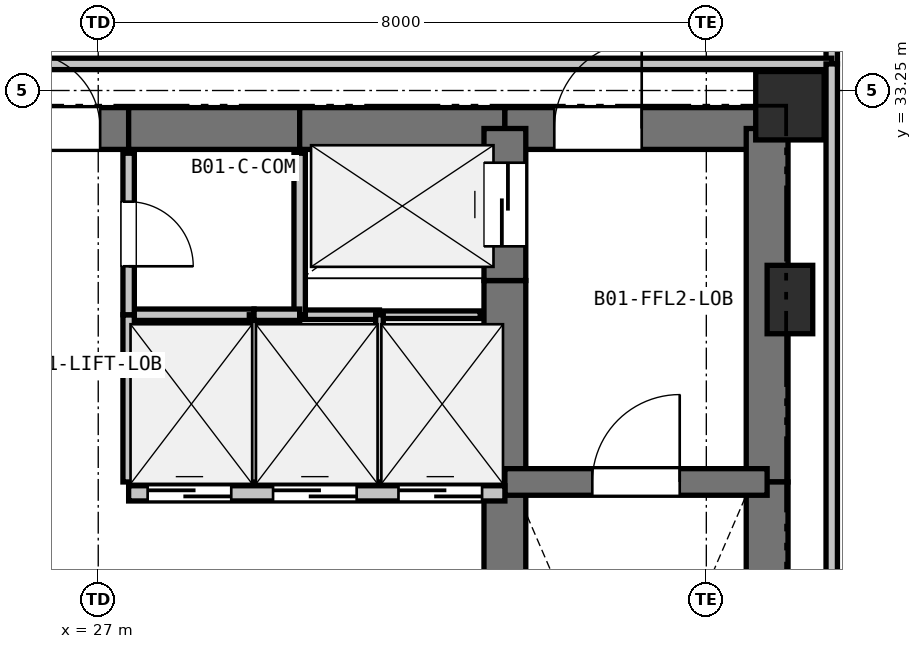
"""IFC4 building model, lengths in metres.
Left out: names, types, materials, properties, quantities, classifications, styles, units other than length and angle.
Written with IfcOpenShell. Run it as: python <this file> out.ifc"""

import sys

from ifc_helpers import new_model, si_unit, direction, frame, frame_2d, origin, origin_2d, place, context, subcontext, project, spatial, rectangle, extrude, element, fill, save


model = new_model("IFC4")
c1 = context("Model", 3, precision=1e-05, world=origin(), true_north=direction((0.0, 1.0)))
c2 = subcontext(c1, "Body", "Model", "MODEL_VIEW")
j1 = project(units=[si_unit("LENGTHUNIT", "METRE"), si_unit("PLANEANGLEUNIT", "RADIAN")], contexts=[c1])
p1 = place(None, origin())
s1 = spatial("IfcSite", under=j1, at=p1, CompositionType="ELEMENT")
p2 = place(p1, origin())
s2 = spatial("IfcBuilding", under=s1, at=p2, CompositionType="ELEMENT")
p3 = place(p2, frame((0.0, 0.0, -4.5)))
s3 = spatial("IfcBuildingStorey", under=s2, at=p3, CompositionType="ELEMENT", Elevation=-4.5)
p4 = place(p3, frame((36.1, 33.05, 0.0), z_axis=(0.0, 0.0, 1.0), x_axis=(1.0, 0.0, 0.0)))
e1 = element("IfcColumn", 1, at=p4, inside=s3, PredefinedType="COLUMN", context=c2, shape_type="SweptSolid", body=[
    extrude(rectangle(XDim=0.9, YDim=0.9, at=origin_2d()), origin(), (0.0, 0.0, 1.0), 4.5),
])
p5 = place(p3, frame((36.1, 30.5, 0.0), z_axis=(0.0, 0.0, 1.0), x_axis=(1.0, 0.0, 0.0)))
e2 = element("IfcColumn", 2, at=p5, inside=s3, PredefinedType="PILASTER", context=c2, shape_type="SweptSolid", body=[
    extrude(rectangle(XDim=0.6, YDim=0.9, at=origin_2d()), origin(), (0.0, 0.0, 1.0), 4.5),
])
p6 = place(p3, frame((25.65, 32.75, 0.0), z_axis=(0.0, 0.0, 1.0), x_axis=(1.0, 0.0, 0.0)))
e3 = element("IfcWall", 3, at=p6, inside=s3, PredefinedType="SHEAR", context=c2, shape_type="SweptSolid", body=[
    extrude(rectangle(XDim=1.75, YDim=0.55, at=frame_2d((0.875, 0.0))), origin(), (0.0, 0.0, 1.0), 4.2),
])
p7 = place(p6, frame((0.375, 0.0, 0.0)))
e4 = element("IfcOpeningElement", 4, at=p7, cuts=e3, PredefinedType="OPENING", context=c2, shape_type="SweptSolid", body=[
    extrude(rectangle(XDim=1.0, YDim=2.15, at=frame_2d((0.5, 1.075))), frame((0.0, 0.285, 0.0), z_axis=(0.0, -1.0, 0.0), x_axis=(1.0, 0.0, 0.0)), (0.0, 0.0, 1.0), 0.57),
])
p8 = place(p3, frame((27.4, 32.75, 0.0), z_axis=(0.0, 0.0, 1.0), x_axis=(1.0, 0.0, 0.0)))
e5 = element("IfcWall", 5, at=p8, inside=s3, PredefinedType="SHEAR", context=c2, shape_type="SweptSolid", body=[
    extrude(rectangle(XDim=2.25, YDim=0.55, at=frame_2d((1.125, 0.0))), origin(), (0.0, 0.0, 1.0), 4.2),
])
p9 = place(p3, frame((29.65, 32.75, 0.0), z_axis=(0.0, 0.0, 1.0), x_axis=(1.0, 0.0, 0.0)))
e6 = element("IfcWall", 6, at=p9, inside=s3, PredefinedType="SHEAR", context=c2, shape_type="SweptSolid", body=[
    extrude(rectangle(XDim=2.7, YDim=0.55, at=frame_2d((1.35, 0.0))), origin(), (0.0, 0.0, 1.0), 4.2),
])
p10 = place(p3, frame((32.35, 32.75, 0.0), z_axis=(0.0, 0.0, 1.0), x_axis=(1.0, 0.0, 0.0)))
e7 = element("IfcWall", 7, at=p10, inside=s3, PredefinedType="SHEAR", context=c2, shape_type="SweptSolid", body=[
    extrude(rectangle(XDim=3.45, YDim=0.55, at=frame_2d((1.725, 0.0))), origin(), (0.0, 0.0, 1.0), 4.2),
])
p11 = place(p10, frame((0.65, 0.0, 0.0)))
e8 = element("IfcOpeningElement", 8, at=p11, cuts=e7, PredefinedType="OPENING", context=c2, shape_type="SweptSolid", body=[
    extrude(rectangle(XDim=1.15, YDim=2.15, at=frame_2d((0.575, 1.075))), frame((0.0, 0.285, 0.0), z_axis=(0.0, -1.0, 0.0), x_axis=(1.0, 0.0, 0.0)), (0.0, 0.0, 1.0), 0.57),
])
p12 = place(p3, frame((35.8, 32.75, 0.0), z_axis=(0.0, 0.0, 1.0), x_axis=(0.0, -1.0, 0.0)))
e9 = element("IfcWall", 9, at=p12, inside=s3, PredefinedType="SHEAR", context=c2, shape_type="SweptSolid", body=[
    extrude(rectangle(XDim=4.65, YDim=0.55, at=frame_2d((2.325, 0.0))), origin(), (0.0, 0.0, 1.0), 4.2),
])
p13 = place(p3, frame((35.8, 28.1, 0.0), z_axis=(0.0, 0.0, 1.0), x_axis=(0.0, -1.0, 0.0)))
e10 = element("IfcWall", 10, at=p13, inside=s3, PredefinedType="SHEAR", context=c2, shape_type="SweptSolid", body=[
    extrude(rectangle(XDim=7.35, YDim=0.55, at=frame_2d((3.675, 0.0))), origin(), (0.0, 0.0, 1.0), 4.2),
])
p14 = place(p3, frame((32.35, 25.55, 0.0), z_axis=(0.0, 0.0, 1.0), x_axis=(0.0, 1.0, 0.0)))
e11 = element("IfcWall", 11, at=p14, inside=s3, PredefinedType="SHEAR", context=c2, shape_type="SweptSolid", body=[
    extrude(rectangle(XDim=2.4, YDim=0.55, at=frame_2d((1.2, 0.0))), origin(), (0.0, 0.0, 1.0), 4.2),
])
p15 = place(p3, frame((32.35, 27.95, 0.0), z_axis=(0.0, 0.0, 1.0), x_axis=(0.0, 1.0, 0.0)))
e12 = element("IfcWall", 12, at=p15, inside=s3, PredefinedType="SHEAR", context=c2, shape_type="SweptSolid", body=[
    extrude(rectangle(XDim=2.8, YDim=0.55, at=frame_2d((1.4, 0.0))), origin(), (0.0, 0.0, 1.0), 4.2),
])
p16 = place(p3, frame((32.35, 30.75, 0.0), z_axis=(0.0, 0.0, 1.0), x_axis=(0.0, 1.0, 0.0)))
e13 = element("IfcWall", 13, at=p16, inside=s3, PredefinedType="SHEAR", context=c2, shape_type="SweptSolid", body=[
    extrude(rectangle(XDim=2.0, YDim=0.55, at=frame_2d((1.0, 0.0))), origin(), (0.0, 0.0, 1.0), 4.2),
])
p17 = place(p16, frame((0.45, 0.0, 0.0)))
e14 = element("IfcOpeningElement", 14, at=p17, cuts=e13, PredefinedType="OPENING", context=c2, shape_type="SweptSolid", body=[
    extrude(rectangle(XDim=1.1, YDim=2.15, at=frame_2d((0.55, 1.075))), frame((0.0, 0.285, 0.0), z_axis=(0.0, -1.0, 0.0), x_axis=(1.0, 0.0, 0.0)), (0.0, 0.0, 1.0), 0.57),
])
p18 = place(p3, frame((32.35, 28.1, 0.0), z_axis=(0.0, 0.0, 1.0), x_axis=(1.0, 0.0, 0.0)))
e15 = element("IfcWall", 15, at=p18, inside=s3, PredefinedType="SHEAR", context=c2, shape_type="SweptSolid", body=[
    extrude(rectangle(XDim=3.45, YDim=0.35, at=frame_2d((1.725, 0.0))), origin(), (0.0, 0.0, 1.0), 4.2),
])
p19 = place(p18, frame((1.15, 0.0, 0.0)))
e16 = element("IfcOpeningElement", 16, at=p19, cuts=e15, PredefinedType="OPENING", context=c2, shape_type="SweptSolid", body=[
    extrude(rectangle(XDim=1.15, YDim=2.15, at=frame_2d((0.575, 1.075))), frame((0.0, 0.185, 0.0), z_axis=(0.0, -1.0, 0.0), x_axis=(1.0, 0.0, 0.0)), (0.0, 0.0, 1.0), 0.37),
])
p20 = place(p3, frame((27.4, 27.95, 0.0), z_axis=(0.0, 0.0, 1.0), x_axis=(1.0, 0.0, 0.0)))
e17 = element("IfcWall", 17, at=p20, inside=s3, PredefinedType="PARTITIONING", context=c2, shape_type="SweptSolid", body=[
    extrude(rectangle(XDim=4.95, YDim=0.2, at=frame_2d((2.475, 0.0))), origin(), (0.0, 0.0, 1.0), 4.2),
])
p21 = place(p20, frame((0.25, 0.0, 0.0)))
e18 = element("IfcOpeningElement", 18, at=p21, cuts=e17, PredefinedType="OPENING", context=c2, shape_type="SweptSolid", body=[
    extrude(rectangle(XDim=1.1, YDim=2.15, at=frame_2d((0.55, 1.075))), frame((0.0, 0.11, 0.0), z_axis=(0.0, -1.0, 0.0), x_axis=(1.0, 0.0, 0.0)), (0.0, 0.0, 1.0), 0.22),
])
p22 = place(p20, frame((1.9, 0.0, 0.0)))
e19 = element("IfcOpeningElement", 19, at=p22, cuts=e17, PredefinedType="OPENING", context=c2, shape_type="SweptSolid", body=[
    extrude(rectangle(XDim=1.1, YDim=2.15, at=frame_2d((0.55, 1.075))), frame((0.0, 0.11, 0.0), z_axis=(0.0, -1.0, 0.0), x_axis=(1.0, 0.0, 0.0)), (0.0, 0.0, 1.0), 0.22),
])
p23 = place(p20, frame((3.55, 0.0, 0.0)))
e20 = element("IfcOpeningElement", 20, at=p23, cuts=e17, PredefinedType="OPENING", context=c2, shape_type="SweptSolid", body=[
    extrude(rectangle(XDim=1.1, YDim=2.15, at=frame_2d((0.55, 1.075))), frame((0.0, 0.11, 0.0), z_axis=(0.0, -1.0, 0.0), x_axis=(1.0, 0.0, 0.0)), (0.0, 0.0, 1.0), 0.22),
])
p24 = place(p3, frame((32.025, 30.3, 0.0), z_axis=(0.0, 0.0, 1.0), x_axis=(-1.0, 0.0, 0.0)))
e21 = element("IfcWall", 21, at=p24, inside=s3, PredefinedType="PARTITIONING", context=c2, shape_type="SweptSolid", body=[
    extrude(rectangle(XDim=1.325, YDim=0.1, at=frame_2d((0.663, 0.0))), origin(), (0.0, 0.0, 1.0), 4.2),
])
p25 = place(p3, frame((30.7, 30.3, 0.0), z_axis=(0.0, 0.0, 1.0), x_axis=(-1.0, 0.0, 0.0)))
e22 = element("IfcWall", 22, at=p25, inside=s3, PredefinedType="PARTITIONING", context=c2, shape_type="SweptSolid", body=[
    extrude(rectangle(XDim=1.05, YDim=0.125, at=frame_2d((0.525, 0.0))), origin(), (0.0, 0.0, 1.0), 4.2),
])
p26 = place(p3, frame((29.65, 30.3, 0.0), z_axis=(0.0, 0.0, 1.0), x_axis=(0.0, 1.0, 0.0)))
e23 = element("IfcWall", 23, at=p26, inside=s3, PredefinedType="PARTITIONING", context=c2, shape_type="SweptSolid", body=[
    extrude(rectangle(XDim=2.125, YDim=0.15, at=frame_2d((1.062, 0.0))), origin(), (0.0, 0.0, 1.0), 4.2),
])
p27 = place(p3, frame((27.4, 30.3, 0.0), z_axis=(0.0, 0.0, 1.0), x_axis=(1.0, 0.0, 0.0)))
e24 = element("IfcWall", 24, at=p27, inside=s3, PredefinedType="PARTITIONING", context=c2, shape_type="SweptSolid", body=[
    extrude(rectangle(XDim=1.65, YDim=0.15, at=frame_2d((0.825, 0.0))), origin(), (0.0, 0.0, 1.0), 4.2),
])
p28 = place(p3, frame((29.05, 30.3, 0.0), z_axis=(0.0, 0.0, 1.0), x_axis=(0.0, -1.0, 0.0)))
e25 = element("IfcWall", 25, at=p28, inside=s3, PredefinedType="PARTITIONING", context=c2, shape_type="SweptSolid", body=[
    extrude(rectangle(XDim=2.2, YDim=0.125, at=frame_2d((1.1, 0.0))), origin(), (0.0, 0.0, 1.0), 4.2),
])
p29 = place(p3, frame((27.4, 28.1, 0.0), z_axis=(0.0, 0.0, 1.0), x_axis=(0.0, 1.0, 0.0)))
e26 = element("IfcWall", 26, at=p29, inside=s3, PredefinedType="PARTITIONING", context=c2, shape_type="SweptSolid", body=[
    extrude(rectangle(XDim=2.2, YDim=0.15, at=frame_2d((1.1, 0.0))), origin(), (0.0, 0.0, 1.0), 4.2),
])
p30 = place(p3, frame((29.05, 30.3, 0.0), z_axis=(0.0, 0.0, 1.0), x_axis=(1.0, 0.0, 0.0)))
e27 = element("IfcWall", 27, at=p30, inside=s3, PredefinedType="PARTITIONING", context=c2, shape_type="SweptSolid", body=[
    extrude(rectangle(XDim=0.6, YDim=0.15, at=frame_2d((0.3, 0.0))), origin(), (0.0, 0.0, 1.0), 4.2),
])
p31 = place(p3, frame((30.7, 30.3, 0.0), z_axis=(0.0, 0.0, 1.0), x_axis=(0.0, -1.0, 0.0)))
e28 = element("IfcWall", 28, at=p31, inside=s3, PredefinedType="PARTITIONING", context=c2, shape_type="SweptSolid", body=[
    extrude(rectangle(XDim=2.2, YDim=0.1, at=frame_2d((1.1, 0.0))), origin(), (0.0, 0.0, 1.0), 4.2),
])
p32 = place(p3, frame((27.4, 32.425, 0.0), z_axis=(0.0, 0.0, 1.0), x_axis=(0.0, -1.0, 0.0)))
e29 = element("IfcWall", 29, at=p32, inside=s3, PredefinedType="PARTITIONING", context=c2, shape_type="SweptSolid", body=[
    extrude(rectangle(XDim=2.125, YDim=0.15, at=frame_2d((1.062, 0.0))), origin(), (0.0, 0.0, 1.0), 4.2),
])
p33 = place(p32, frame((0.637, 0.0, 0.0)))
e30 = element("IfcOpeningElement", 30, at=p33, cuts=e29, PredefinedType="OPENING", context=c2, shape_type="SweptSolid", body=[
    extrude(rectangle(XDim=0.85, YDim=2.1, at=frame_2d((0.425, 1.05))), frame((0.0, 0.085, 0.0), z_axis=(0.0, -1.0, 0.0), x_axis=(1.0, 0.0, 0.0)), (0.0, 0.0, 1.0), 0.17),
])
p34 = place(p3, frame((36.65, 35.4, 0.0), z_axis=(0.0, 0.0, 1.0), x_axis=(0.0, -1.0, 0.0)))
e31 = element("IfcWall", 31, at=p34, inside=s3, PredefinedType="PARTITIONING", context=c2, shape_type="SweptSolid", body=[
    extrude(rectangle(XDim=1.8, YDim=0.15, at=frame_2d((0.9, 0.0))), origin(), (0.0, 0.0, 1.0), 4.2),
])
p35 = place(p34, frame((0.4, 0.0, 0.0)))
e32 = element("IfcOpeningElement", 32, at=p35, cuts=e31, PredefinedType="OPENING", context=c2, shape_type="SweptSolid", body=[
    extrude(rectangle(XDim=1.0, YDim=2.15, at=frame_2d((0.5, 1.075))), frame((0.0, 0.085, 0.0), z_axis=(0.0, -1.0, 0.0), x_axis=(1.0, 0.0, 0.0)), (0.0, 0.0, 1.0), 0.17),
])
p36 = place(p3, frame((36.65, 33.6, 0.0), z_axis=(0.0, 0.0, 1.0), x_axis=(-1.0, 0.0, 0.0)))
e33 = element("IfcWall", 33, at=p36, inside=s3, PredefinedType="PARTITIONING", context=c2, shape_type="SweptSolid", body=[
    extrude(rectangle(XDim=15.3, YDim=0.15, at=frame_2d((7.65, 0.0))), origin(), (0.0, 0.0, 1.0), 4.2),
])
p37 = place(p3, frame((36.65, 19.9, 0.0), z_axis=(0.0, 0.0, 1.0), x_axis=(0.0, 1.0, 0.0)))
e34 = element("IfcWall", 34, at=p37, inside=s3, PredefinedType="PARTITIONING", context=c2, shape_type="SweptSolid", body=[
    extrude(rectangle(XDim=13.7, YDim=0.15, at=frame_2d((6.85, 0.0))), origin(), (0.0, 0.0, 1.0), 4.2),
])
p38 = place(p21, origin())
e35 = element("IfcDoor", 35, at=p38, inside=s3, OperationType="SLIDING_TO_LEFT", PredefinedType="DOOR", context=c2, shape_type="SweptSolid", body=[
    extrude(rectangle(XDim=1.1, YDim=2.15, at=frame_2d((0.55, 1.075))), frame((0.0, 0.025, 0.0), z_axis=(0.0, -1.0, 0.0), x_axis=(1.0, 0.0, 0.0)), (0.0, 0.0, 1.0), 0.05),
])
fill(e18, e35)
p39 = place(p22, origin())
e36 = element("IfcDoor", 36, at=p39, inside=s3, OperationType="SLIDING_TO_LEFT", PredefinedType="DOOR", context=c2, shape_type="SweptSolid", body=[
    extrude(rectangle(XDim=1.1, YDim=2.15, at=frame_2d((0.55, 1.075))), frame((0.0, 0.025, 0.0), z_axis=(0.0, -1.0, 0.0), x_axis=(1.0, 0.0, 0.0)), (0.0, 0.0, 1.0), 0.05),
])
fill(e19, e36)
p40 = place(p23, origin())
e37 = element("IfcDoor", 37, at=p40, inside=s3, OperationType="SLIDING_TO_LEFT", PredefinedType="DOOR", context=c2, shape_type="SweptSolid", body=[
    extrude(rectangle(XDim=1.1, YDim=2.15, at=frame_2d((0.55, 1.075))), frame((0.0, 0.025, 0.0), z_axis=(0.0, -1.0, 0.0), x_axis=(1.0, 0.0, 0.0)), (0.0, 0.0, 1.0), 0.05),
])
fill(e20, e37)
p41 = place(p7, origin())
e38 = element("IfcDoor", 38, at=p41, inside=s3, OperationType="SINGLE_SWING_LEFT", PredefinedType="DOOR", context=c2, shape_type="SweptSolid", body=[
    extrude(rectangle(XDim=1.0, YDim=2.15, at=frame_2d((0.5, 1.075))), frame((0.0, 0.025, 0.0), z_axis=(0.0, -1.0, 0.0), x_axis=(1.0, 0.0, 0.0)), (0.0, 0.0, 1.0), 0.05),
])
fill(e4, e38)
p42 = place(p17, origin())
e39 = element("IfcDoor", 39, at=p42, inside=s3, OperationType="SLIDING_TO_LEFT", PredefinedType="DOOR", context=c2, shape_type="SweptSolid", body=[
    extrude(rectangle(XDim=1.1, YDim=2.15, at=frame_2d((0.55, 1.075))), frame((0.0, 0.025, 0.0), z_axis=(0.0, -1.0, 0.0), x_axis=(1.0, 0.0, 0.0)), (0.0, 0.0, 1.0), 0.05),
])
fill(e14, e39)
p43 = place(p19, origin())
e40 = element("IfcDoor", 40, at=p43, inside=s3, OperationType="SINGLE_SWING_RIGHT", PredefinedType="DOOR", context=c2, shape_type="SweptSolid", body=[
    extrude(rectangle(XDim=1.15, YDim=2.15, at=frame_2d((0.575, 1.075))), frame((0.0, 0.025, 0.0), z_axis=(0.0, -1.0, 0.0), x_axis=(1.0, 0.0, 0.0)), (0.0, 0.0, 1.0), 0.05),
])
fill(e16, e40)
p44 = place(p11, origin())
e41 = element("IfcDoor", 41, at=p44, inside=s3, OperationType="SINGLE_SWING_RIGHT", PredefinedType="DOOR", context=c2, shape_type="SweptSolid", body=[
    extrude(rectangle(XDim=1.15, YDim=2.15, at=frame_2d((0.575, 1.075))), frame((0.0, 0.025, 0.0), z_axis=(0.0, -1.0, 0.0), x_axis=(1.0, 0.0, 0.0)), (0.0, 0.0, 1.0), 0.05),
])
fill(e8, e41)
p45 = place(p33, origin())
e42 = element("IfcDoor", 42, at=p45, inside=s3, OperationType="SINGLE_SWING_RIGHT", PredefinedType="DOOR", context=c2, shape_type="SweptSolid", body=[
    extrude(rectangle(XDim=0.85, YDim=2.1, at=frame_2d((0.425, 1.05))), frame((0.0, 0.025, 0.0), z_axis=(0.0, -1.0, 0.0), x_axis=(1.0, 0.0, 0.0)), (0.0, 0.0, 1.0), 0.05),
])
fill(e30, e42)
save(model, sys.argv[1])
